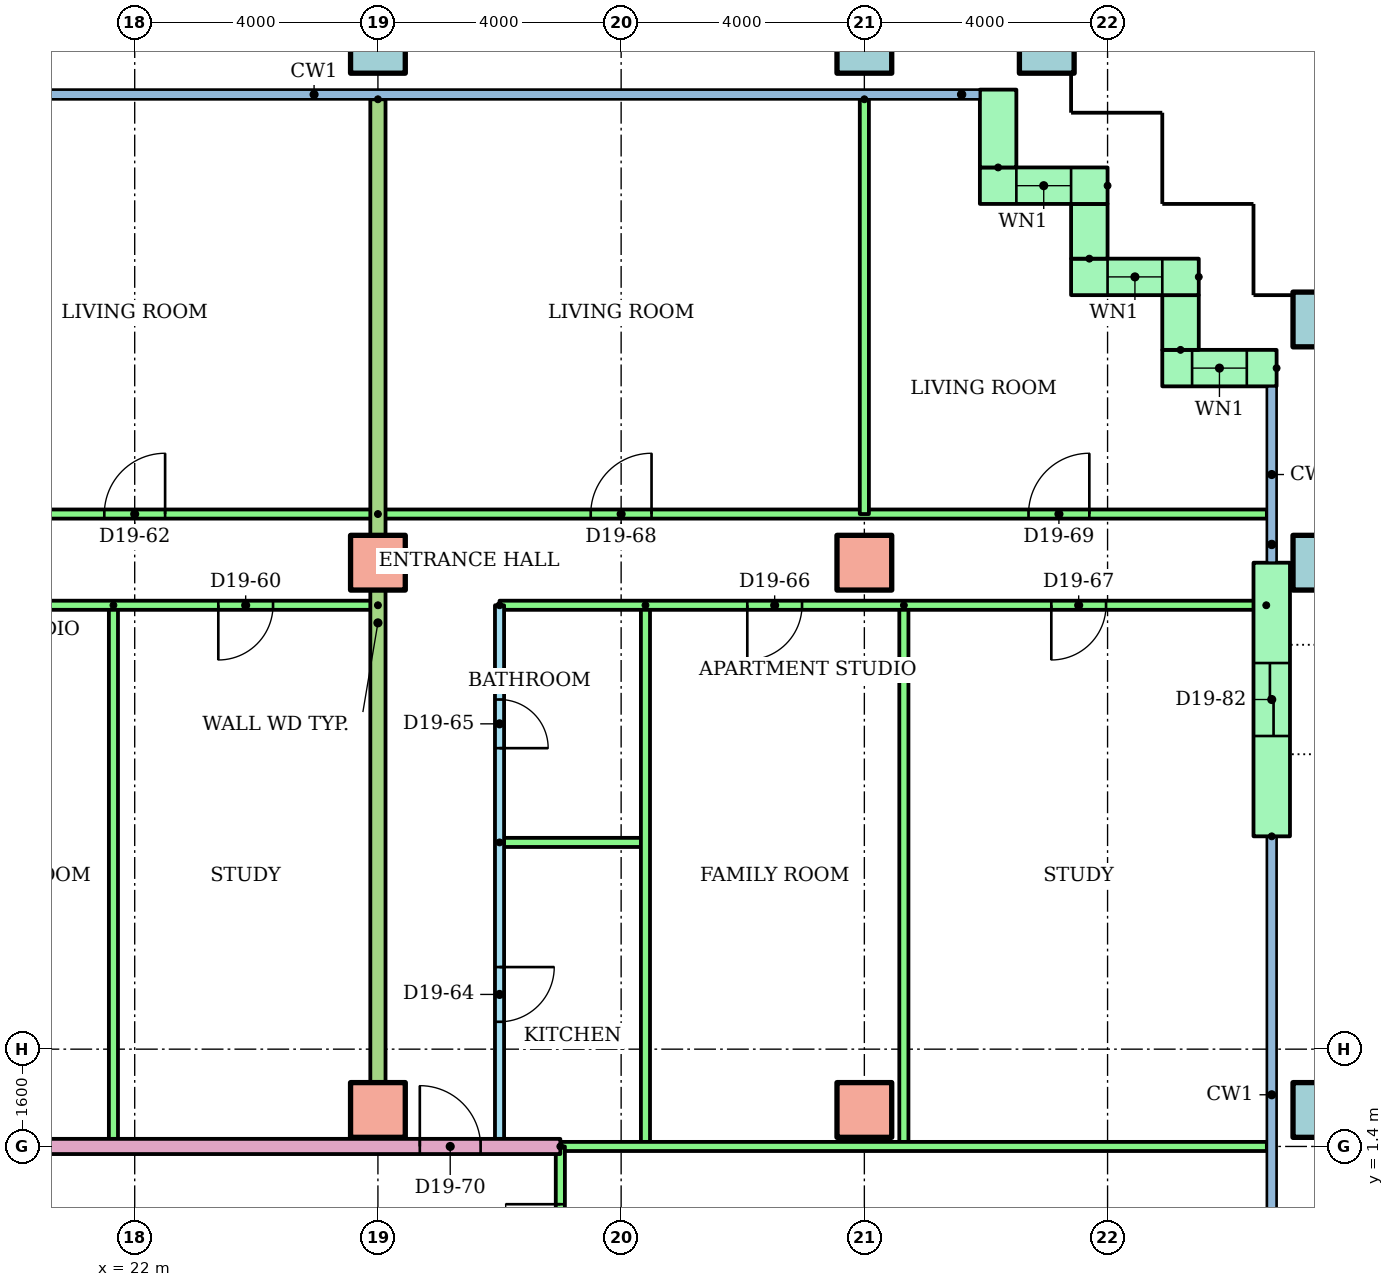
"""IFC4 building model, lengths in metres.
Left out: names, types, materials, properties, quantities, classifications, styles, units other than length and angle.
Written with IfcOpenShell. Run it as: python <this file> out.ifc"""

import sys

from ifc_helpers import new_model, si_unit, direction, frame, frame_2d, origin, origin_2d, place, context, subcontext, project, spatial, rectangle, hollow_rectangle, extrude, element, fill, save


model = new_model("IFC4")
c1 = context("Model", 3, precision=1e-05, world=origin(), true_north=direction((0.0, 1.0)))
c2 = subcontext(c1, "Body", "Model", "MODEL_VIEW")
j1 = project(units=[si_unit("LENGTHUNIT", "METRE"), si_unit("PLANEANGLEUNIT", "RADIAN")], contexts=[c1])
p1 = place(None, origin())
s1 = spatial("IfcSite", under=j1, at=p1, CompositionType="ELEMENT")
p2 = place(p1, origin())
s2 = spatial("IfcBuilding", under=s1, at=p2, CompositionType="ELEMENT")
p3 = place(p2, frame((0.0, 0.0, 77.5)))
s3 = spatial("IfcBuildingStorey", under=s2, at=p3, CompositionType="ELEMENT", Elevation=77.5)
for number, where in (
    (1, (26.0, 2.0, 0.0)),
    (2, (34.0, 2.0, 0.0)),
):
    element("IfcColumn", number, at=place(p3, frame(where)), inside=s3, PredefinedType="COLUMN", context=c2, shape_type="SweptSolid", body=[
        extrude(rectangle(XDim=0.9, YDim=0.9, at=origin_2d()), origin(), (0.0, 0.0, 1.0), 3.2),
    ])
p4 = place(p3, frame((41.5, 2.0, 0.0)))
e3 = element("IfcColumn", 3, at=p4, inside=s3, PredefinedType="COLUMN", context=c2, shape_type="SweptSolid", body=[
    extrude(hollow_rectangle(XDim=0.9, YDim=0.9, WallThickness=0.045, at=origin_2d()), origin(), (0.0, 0.0, 1.0), 3.2),
])
for number, where in (
    (4, (26.0, 11.0, 0.0)),
    (5, (34.0, 11.0, 0.0)),
):
    element("IfcColumn", number, at=place(p3, frame(where)), inside=s3, PredefinedType="COLUMN", context=c2, shape_type="SweptSolid", body=[
        extrude(rectangle(XDim=0.9, YDim=0.9, at=origin_2d()), origin(), (0.0, 0.0, 1.0), 3.2),
    ])
for number, where in (
    (6, (41.5, 11.0, 0.0)),
    (7, (41.5, 15.0, 0.0)),
    (8, (26.0, 19.5, 0.0)),
    (9, (34.0, 19.5, 0.0)),
    (10, (37.0, 19.5, 0.0)),
):
    element("IfcColumn", number, at=place(p3, frame(where)), inside=s3, PredefinedType="COLUMN", context=c2, shape_type="SweptSolid", body=[
        extrude(hollow_rectangle(XDim=0.9, YDim=0.9, WallThickness=0.045, at=origin_2d()), origin(), (0.0, 0.0, 1.0), 3.2),
    ])
p5 = place(p3, frame((40.78, 14.2, 0.0), z_axis=(0.0, 0.0, 1.0), x_axis=(-1.0, 0.0, 0.0)))
e11 = element("IfcWall", 11, at=p5, inside=s3, PredefinedType="STANDARD", context=c2, shape_type="SweptSolid", body=[
    extrude(rectangle(XDim=1.88, YDim=0.6, at=frame_2d((0.94, 0.0))), origin(), (0.0, 0.0, 1.0), 2.92),
])
p6 = place(p5, frame((0.49, 0.0, 0.9)))
e12 = element("IfcOpeningElement", 12, at=p6, cuts=e11, PredefinedType="OPENING", context=c2, shape_type="SweptSolid", body=[
    extrude(rectangle(XDim=0.9, YDim=1.5, at=frame_2d((0.45, 0.75))), frame((0.0, 0.31, 0.0), z_axis=(0.0, -1.0, 0.0), x_axis=(1.0, 0.0, 0.0)), (0.0, 0.0, 1.0), 0.62),
])
p7 = place(p3, frame((39.2, 14.5, 0.0), z_axis=(0.0, 0.0, 1.0), x_axis=(0.0, 1.0, 0.0)))
e13 = element("IfcWall", 13, at=p7, inside=s3, PredefinedType="STANDARD", context=c2, shape_type="SweptSolid", body=[
    extrude(rectangle(XDim=0.9, YDim=0.6, at=frame_2d((0.45, 0.0))), origin(), (0.0, 0.0, 1.0), 2.92),
])
p8 = place(p3, frame((39.5, 15.7, 0.0), z_axis=(0.0, 0.0, 1.0), x_axis=(-1.0, 0.0, 0.0)))
e14 = element("IfcWall", 14, at=p8, inside=s3, PredefinedType="STANDARD", context=c2, shape_type="SweptSolid", body=[
    extrude(rectangle(XDim=2.1, YDim=0.6, at=frame_2d((1.05, 0.0))), origin(), (0.0, 0.0, 1.0), 2.92),
])
p9 = place(p8, frame((0.6, 0.0, 0.9)))
e15 = element("IfcOpeningElement", 15, at=p9, cuts=e14, PredefinedType="OPENING", context=c2, shape_type="SweptSolid", body=[
    extrude(rectangle(XDim=0.9, YDim=1.5, at=frame_2d((0.45, 0.75))), frame((0.0, 0.31, 0.0), z_axis=(0.0, -1.0, 0.0), x_axis=(1.0, 0.0, 0.0)), (0.0, 0.0, 1.0), 0.62),
])
p10 = place(p3, frame((37.7, 16.0, 0.0), z_axis=(0.0, 0.0, 1.0), x_axis=(0.0, 1.0, 0.0)))
e16 = element("IfcWall", 16, at=p10, inside=s3, PredefinedType="STANDARD", context=c2, shape_type="SweptSolid", body=[
    extrude(rectangle(XDim=0.9, YDim=0.6, at=frame_2d((0.45, 0.0))), origin(), (0.0, 0.0, 1.0), 2.92),
])
p11 = place(p3, frame((38.0, 17.2, 0.0), z_axis=(0.0, 0.0, 1.0), x_axis=(-1.0, 0.0, 0.0)))
e17 = element("IfcWall", 17, at=p11, inside=s3, PredefinedType="STANDARD", context=c2, shape_type="SweptSolid", body=[
    extrude(rectangle(XDim=2.1, YDim=0.6, at=frame_2d((1.05, 0.0))), origin(), (0.0, 0.0, 1.0), 2.92),
])
p12 = place(p11, frame((0.6, 0.0, 0.9)))
e18 = element("IfcOpeningElement", 18, at=p12, cuts=e17, PredefinedType="OPENING", context=c2, shape_type="SweptSolid", body=[
    extrude(rectangle(XDim=0.9, YDim=1.5, at=frame_2d((0.45, 0.75))), frame((0.0, 0.31, 0.0), z_axis=(0.0, -1.0, 0.0), x_axis=(1.0, 0.0, 0.0)), (0.0, 0.0, 1.0), 0.62),
])
p13 = place(p3, frame((36.2, 17.5, 0.0), z_axis=(0.0, 0.0, 1.0), x_axis=(0.0, 1.0, 0.0)))
e19 = element("IfcWall", 19, at=p13, inside=s3, PredefinedType="STANDARD", context=c2, shape_type="SweptSolid", body=[
    extrude(rectangle(XDim=1.28, YDim=0.6, at=frame_2d((0.64, 0.0))), origin(), (0.0, 0.0, 1.0), 2.92),
])
p14 = place(p3, frame((40.7, 6.5, 0.0), z_axis=(0.0, 0.0, 1.0), x_axis=(0.0, 1.0, 0.0)))
e20 = element("IfcWall", 20, at=p14, inside=s3, PredefinedType="STANDARD", context=c2, shape_type="SweptSolid", body=[
    extrude(rectangle(XDim=4.5, YDim=0.6, at=frame_2d((2.25, 0.0))), origin(), (0.0, 0.0, 1.0), 2.92),
])
p15 = place(p14, frame((1.65, 0.0, 0.0)))
e21 = element("IfcOpeningElement", 21, at=p15, cuts=e20, PredefinedType="OPENING", context=c2, shape_type="SweptSolid", body=[
    extrude(rectangle(XDim=1.2, YDim=2.1, at=frame_2d((0.6, 1.05))), frame((0.0, 0.31, 0.0), z_axis=(0.0, -1.0, 0.0), x_axis=(1.0, 0.0, 0.0)), (0.0, 0.0, 1.0), 0.62),
])
p16 = place(p3, frame((21.65, 10.3, 0.0), z_axis=(0.0, 0.0, 1.0), x_axis=(0.0, -1.0, 0.0)))
e22 = element("IfcWall", 22, at=p16, inside=s3, PredefinedType="PARTITIONING", context=c2, shape_type="SweptSolid", body=[
    extrude(rectangle(XDim=8.9, YDim=0.15, at=frame_2d((4.45, 0.0))), origin(), (0.0, 0.0, 1.0), 2.4),
])
p17 = place(p3, frame((26.0, 10.3, 0.0), z_axis=(0.0, 0.0, 1.0), x_axis=(-1.0, 0.0, 0.0)))
e23 = element("IfcWall", 23, at=p17, inside=s3, PredefinedType="PARTITIONING", context=c2, shape_type="SweptSolid", body=[
    extrude(rectangle(XDim=10.0, YDim=0.15, at=frame_2d((5.0, 0.0))), origin(), (0.0, 0.0, 1.0), 2.4),
])
p18 = place(p17, frame((5.525, 0.0, 0.0)))
e24 = element("IfcOpeningElement", 24, at=p18, cuts=e23, PredefinedType="OPENING", context=c2, shape_type="SweptSolid", body=[
    extrude(rectangle(XDim=0.9, YDim=2.1, at=frame_2d((0.45, 1.05))), frame((0.0, 0.085, 0.0), z_axis=(0.0, -1.0, 0.0), x_axis=(1.0, 0.0, 0.0)), (0.0, 0.0, 1.0), 0.17),
])
p19 = place(p17, frame((1.725, 0.0, 0.0)))
e25 = element("IfcOpeningElement", 25, at=p19, cuts=e23, PredefinedType="OPENING", context=c2, shape_type="SweptSolid", body=[
    extrude(rectangle(XDim=0.9, YDim=2.1, at=frame_2d((0.45, 1.05))), frame((0.0, 0.085, 0.0), z_axis=(0.0, -1.0, 0.0), x_axis=(1.0, 0.0, 0.0)), (0.0, 0.0, 1.0), 0.17),
])
p20 = place(p3, frame((14.0, 11.8, 0.0)))
e26 = element("IfcWall", 26, at=p20, inside=s3, PredefinedType="PARTITIONING", context=c2, shape_type="SweptSolid", body=[
    extrude(rectangle(XDim=12.0, YDim=0.15, at=frame_2d((6.0, 0.0))), origin(), (0.0, 0.0, 1.0), 2.4),
])
p21 = place(p20, frame((1.5, 0.0, 0.0)))
e27 = element("IfcOpeningElement", 27, at=p21, cuts=e26, PredefinedType="OPENING", context=c2, shape_type="SweptSolid", body=[
    extrude(rectangle(XDim=1.0, YDim=2.1, at=frame_2d((0.5, 1.05))), frame((0.0, 0.085, 0.0), z_axis=(0.0, -1.0, 0.0), x_axis=(1.0, 0.0, 0.0)), (0.0, 0.0, 1.0), 0.17),
])
p22 = place(p20, frame((7.5, 0.0, 0.0)))
e28 = element("IfcOpeningElement", 28, at=p22, cuts=e26, PredefinedType="OPENING", context=c2, shape_type="SweptSolid", body=[
    extrude(rectangle(XDim=1.0, YDim=2.1, at=frame_2d((0.5, 1.05))), frame((0.0, 0.085, 0.0), z_axis=(0.0, -1.0, 0.0), x_axis=(1.0, 0.0, 0.0)), (0.0, 0.0, 1.0), 0.17),
])
p23 = place(p3, frame((28.0, 10.3, 0.0), z_axis=(0.0, 0.0, 1.0), x_axis=(0.0, -1.0, 0.0)))
e29 = element("IfcWall", 29, at=p23, inside=s3, PredefinedType="PARTITIONING", context=c2, shape_type="SweptSolid", body=[
    extrude(rectangle(XDim=8.9, YDim=0.15, at=frame_2d((4.45, 0.0))), origin(), (0.0, 0.0, 1.0), 2.4),
])
p24 = place(p23, frame((5.95, 0.0, 0.0)))
e30 = element("IfcOpeningElement", 30, at=p24, cuts=e29, PredefinedType="OPENING", context=c2, shape_type="SweptSolid", body=[
    extrude(rectangle(XDim=0.9, YDim=2.1, at=frame_2d((0.45, 1.05))), frame((0.0, 0.085, 0.0), z_axis=(0.0, -1.0, 0.0), x_axis=(1.0, 0.0, 0.0)), (0.0, 0.0, 1.0), 0.17),
])
p25 = place(p23, frame((1.55, 0.0, 0.0)))
e31 = element("IfcOpeningElement", 31, at=p25, cuts=e29, PredefinedType="OPENING", context=c2, shape_type="SweptSolid", body=[
    extrude(rectangle(XDim=0.8, YDim=2.1, at=frame_2d((0.4, 1.05))), frame((0.0, 0.085, 0.0), z_axis=(0.0, -1.0, 0.0), x_axis=(1.0, 0.0, 0.0)), (0.0, 0.0, 1.0), 0.17),
])
p26 = place(p3, frame((28.0, 6.4, 0.0)))
e32 = element("IfcWall", 32, at=p26, inside=s3, PredefinedType="PARTITIONING", context=c2, shape_type="SweptSolid", body=[
    extrude(rectangle(XDim=2.4, YDim=0.15, at=frame_2d((1.2, 0.0))), origin(), (0.0, 0.0, 1.0), 2.4),
])
for number, where, z_axis, x_axis in (
    (33, (30.4, 10.3, 0.0), (0.0, 0.0, 1.0), (0.0, -1.0, 0.0)),
    (34, (34.65, 10.3, 0.0), (0.0, 0.0, 1.0), (0.0, -1.0, 0.0)),
):
    element("IfcWall", number, at=place(p3, frame(where, z_axis=z_axis, x_axis=x_axis)), inside=s3, PredefinedType="PARTITIONING", context=c2, shape_type="SweptSolid", body=[
        extrude(rectangle(XDim=8.9, YDim=0.15, at=frame_2d((4.45, 0.0))), origin(), (0.0, 0.0, 1.0), 2.4),
    ])
p27 = place(p3, frame((40.61, 10.3, 0.0), z_axis=(0.0, 0.0, 1.0), x_axis=(-1.0, 0.0, 0.0)))
e35 = element("IfcWall", 35, at=p27, inside=s3, PredefinedType="PARTITIONING", context=c2, shape_type="SweptSolid", body=[
    extrude(rectangle(XDim=12.61, YDim=0.15, at=frame_2d((6.305, 0.0))), origin(), (0.0, 0.0, 1.0), 2.4),
])
p28 = place(p27, frame((7.635, 0.0, 0.0)))
e36 = element("IfcOpeningElement", 36, at=p28, cuts=e35, PredefinedType="OPENING", context=c2, shape_type="SweptSolid", body=[
    extrude(rectangle(XDim=0.9, YDim=2.1, at=frame_2d((0.45, 1.05))), frame((0.0, 0.085, 0.0), z_axis=(0.0, -1.0, 0.0), x_axis=(1.0, 0.0, 0.0)), (0.0, 0.0, 1.0), 0.17),
])
p29 = place(p27, frame((2.635, 0.0, 0.0)))
e37 = element("IfcOpeningElement", 37, at=p29, cuts=e35, PredefinedType="OPENING", context=c2, shape_type="SweptSolid", body=[
    extrude(rectangle(XDim=0.9, YDim=2.1, at=frame_2d((0.45, 1.05))), frame((0.0, 0.085, 0.0), z_axis=(0.0, -1.0, 0.0), x_axis=(1.0, 0.0, 0.0)), (0.0, 0.0, 1.0), 0.17),
])
p30 = place(p3, frame((26.0, 11.8, 0.0)))
e38 = element("IfcWall", 38, at=p30, inside=s3, PredefinedType="PARTITIONING", context=c2, shape_type="SweptSolid", body=[
    extrude(rectangle(XDim=14.62, YDim=0.15, at=frame_2d((7.31, 0.0))), origin(), (0.0, 0.0, 1.0), 2.4),
])
p31 = place(p30, frame((3.5, 0.0, 0.0)))
e39 = element("IfcOpeningElement", 39, at=p31, cuts=e38, PredefinedType="OPENING", context=c2, shape_type="SweptSolid", body=[
    extrude(rectangle(XDim=1.0, YDim=2.1, at=frame_2d((0.5, 1.05))), frame((0.0, 0.085, 0.0), z_axis=(0.0, -1.0, 0.0), x_axis=(1.0, 0.0, 0.0)), (0.0, 0.0, 1.0), 0.17),
])
p32 = place(p30, frame((10.7, 0.0, 0.0)))
e40 = element("IfcOpeningElement", 40, at=p32, cuts=e38, PredefinedType="OPENING", context=c2, shape_type="SweptSolid", body=[
    extrude(rectangle(XDim=1.0, YDim=2.1, at=frame_2d((0.5, 1.05))), frame((0.0, 0.085, 0.0), z_axis=(0.0, -1.0, 0.0), x_axis=(1.0, 0.0, 0.0)), (0.0, 0.0, 1.0), 0.17),
])
p33 = place(p3, frame((34.0, 18.621, 0.0), z_axis=(0.0, 0.0, 1.0), x_axis=(0.0, -1.0, 0.0)))
e41 = element("IfcWall", 41, at=p33, inside=s3, PredefinedType="PARTITIONING", context=c2, shape_type="SweptSolid", body=[
    extrude(rectangle(XDim=6.821, YDim=0.15, at=frame_2d((3.411, 0.0))), origin(), (0.0, 0.0, 1.0), 2.4),
])
p34 = place(p3, frame((26.0, 18.621, 0.0), z_axis=(0.0, 0.0, 1.0), x_axis=(0.0, -1.0, 0.0)))
e42 = element("IfcWall", 42, at=p34, inside=s3, PredefinedType="PARTITIONING", context=c2, shape_type="SweptSolid", body=[
    extrude(rectangle(XDim=17.221, YDim=0.25, at=frame_2d((8.611, 0.0))), origin(), (0.0, 0.0, 1.0), 2.4),
])
p35 = place(p3, frame((14.0, 1.4, 0.0)))
e43 = element("IfcWall", 43, at=p35, inside=s3, PredefinedType="PARTITIONING", context=c2, shape_type="SweptSolid", body=[
    extrude(rectangle(XDim=15.0, YDim=0.25, at=frame_2d((7.5, 0.0))), origin(), (0.0, 0.0, 1.0), 2.4),
])
p36 = place(p35, frame((0.5, 0.0, 0.0)))
e44 = element("IfcOpeningElement", 44, at=p36, cuts=e43, PredefinedType="OPENING", context=c2, shape_type="SweptSolid", body=[
    extrude(rectangle(XDim=1.0, YDim=2.1, at=frame_2d((0.5, 1.05))), frame((0.0, 0.135, 0.0), z_axis=(0.0, -1.0, 0.0), x_axis=(1.0, 0.0, 0.0)), (0.0, 0.0, 1.0), 0.27),
])
p37 = place(p35, frame((12.689, 0.0, 0.0)))
e45 = element("IfcOpeningElement", 45, at=p37, cuts=e43, PredefinedType="OPENING", context=c2, shape_type="SweptSolid", body=[
    extrude(rectangle(XDim=1.0, YDim=2.1, at=frame_2d((0.5, 1.05))), frame((0.0, 0.135, 0.0), z_axis=(0.0, -1.0, 0.0), x_axis=(1.0, 0.0, 0.0)), (0.0, 0.0, 1.0), 0.27),
])
p38 = place(p3, frame((29.0, 1.4, 0.0)))
e46 = element("IfcWall", 46, at=p38, inside=s3, PredefinedType="PARTITIONING", context=c2, shape_type="SweptSolid", body=[
    extrude(rectangle(XDim=11.62, YDim=0.15, at=frame_2d((5.81, 0.0))), origin(), (0.0, 0.0, 1.0), 2.4),
])
p39 = place(p3, frame((29.0, -1.4, 0.0), z_axis=(0.0, 0.0, 1.0), x_axis=(0.0, 1.0, 0.0)))
e47 = element("IfcWall", 47, at=p39, inside=s3, PredefinedType="PARTITIONING", context=c2, shape_type="SweptSolid", body=[
    extrude(rectangle(XDim=2.8, YDim=0.15, at=frame_2d((1.4, 0.0))), origin(), (0.0, 0.0, 1.0), 2.4),
])
p40 = place(p39, frame((0.95, 0.0, 0.0)))
e48 = element("IfcOpeningElement", 48, at=p40, cuts=e47, PredefinedType="OPENING", context=c2, shape_type="SweptSolid", body=[
    extrude(rectangle(XDim=0.9, YDim=2.1, at=frame_2d((0.45, 1.05))), frame((0.0, 0.085, 0.0), z_axis=(0.0, -1.0, 0.0), x_axis=(1.0, 0.0, 0.0)), (0.0, 0.0, 1.0), 0.17),
])
p41 = place(p6, origin())
e49 = element("IfcWindow", 49, at=p41, inside=s3, PartitioningType="SINGLE_PANEL", PredefinedType="WINDOW", context=c2, shape_type="SweptSolid", body=[
    extrude(rectangle(XDim=0.9, YDim=1.5, at=frame_2d((0.45, 0.75))), frame((0.0, 0.03, 0.0), z_axis=(0.0, -1.0, 0.0), x_axis=(1.0, 0.0, 0.0)), (0.0, 0.0, 1.0), 0.06),
])
fill(e12, e49)
p42 = place(p9, origin())
e50 = element("IfcWindow", 50, at=p42, inside=s3, PartitioningType="SINGLE_PANEL", PredefinedType="WINDOW", context=c2, shape_type="SweptSolid", body=[
    extrude(rectangle(XDim=0.9, YDim=1.5, at=frame_2d((0.45, 0.75))), frame((0.0, 0.03, 0.0), z_axis=(0.0, -1.0, 0.0), x_axis=(1.0, 0.0, 0.0)), (0.0, 0.0, 1.0), 0.06),
])
fill(e15, e50)
p43 = place(p12, origin())
e51 = element("IfcWindow", 51, at=p43, inside=s3, PartitioningType="SINGLE_PANEL", PredefinedType="WINDOW", context=c2, shape_type="SweptSolid", body=[
    extrude(rectangle(XDim=0.9, YDim=1.5, at=frame_2d((0.45, 0.75))), frame((0.0, 0.03, 0.0), z_axis=(0.0, -1.0, 0.0), x_axis=(1.0, 0.0, 0.0)), (0.0, 0.0, 1.0), 0.06),
])
fill(e18, e51)
p44 = place(p19, origin())
e52 = element("IfcDoor", 52, at=p44, inside=s3, OperationType="SINGLE_SWING_RIGHT", PredefinedType="DOOR", context=c2, shape_type="SweptSolid", body=[
    extrude(rectangle(XDim=0.9, YDim=2.1, at=frame_2d((0.45, 1.05))), frame((0.0, 0.025, 0.0), z_axis=(0.0, -1.0, 0.0), x_axis=(1.0, 0.0, 0.0)), (0.0, 0.0, 1.0), 0.05),
])
fill(e25, e52)
p45 = place(p22, origin())
e53 = element("IfcDoor", 53, at=p45, inside=s3, OperationType="SINGLE_SWING_RIGHT", PredefinedType="DOOR", context=c2, shape_type="SweptSolid", body=[
    extrude(rectangle(XDim=1.0, YDim=2.1, at=frame_2d((0.5, 1.05))), frame((0.0, 0.025, 0.0), z_axis=(0.0, -1.0, 0.0), x_axis=(1.0, 0.0, 0.0)), (0.0, 0.0, 1.0), 0.05),
])
fill(e28, e53)
p46 = place(p24, origin())
e54 = element("IfcDoor", 54, at=p46, inside=s3, OperationType="SINGLE_SWING_LEFT", PredefinedType="DOOR", context=c2, shape_type="SweptSolid", body=[
    extrude(rectangle(XDim=0.9, YDim=2.1, at=frame_2d((0.45, 1.05))), frame((0.0, 0.025, 0.0), z_axis=(0.0, -1.0, 0.0), x_axis=(1.0, 0.0, 0.0)), (0.0, 0.0, 1.0), 0.05),
])
fill(e30, e54)
p47 = place(p25, origin())
e55 = element("IfcDoor", 55, at=p47, inside=s3, OperationType="SINGLE_SWING_RIGHT", PredefinedType="DOOR", context=c2, shape_type="SweptSolid", body=[
    extrude(rectangle(XDim=0.8, YDim=2.1, at=frame_2d((0.4, 1.05))), frame((0.0, 0.025, 0.0), z_axis=(0.0, -1.0, 0.0), x_axis=(1.0, 0.0, 0.0)), (0.0, 0.0, 1.0), 0.05),
])
fill(e31, e55)
p48 = place(p28, origin())
e56 = element("IfcDoor", 56, at=p48, inside=s3, OperationType="SINGLE_SWING_RIGHT", PredefinedType="DOOR", context=c2, shape_type="SweptSolid", body=[
    extrude(rectangle(XDim=0.9, YDim=2.1, at=frame_2d((0.45, 1.05))), frame((0.0, 0.025, 0.0), z_axis=(0.0, -1.0, 0.0), x_axis=(1.0, 0.0, 0.0)), (0.0, 0.0, 1.0), 0.05),
])
fill(e36, e56)
p49 = place(p29, origin())
e57 = element("IfcDoor", 57, at=p49, inside=s3, OperationType="SINGLE_SWING_RIGHT", PredefinedType="DOOR", context=c2, shape_type="SweptSolid", body=[
    extrude(rectangle(XDim=0.9, YDim=2.1, at=frame_2d((0.45, 1.05))), frame((0.0, 0.025, 0.0), z_axis=(0.0, -1.0, 0.0), x_axis=(1.0, 0.0, 0.0)), (0.0, 0.0, 1.0), 0.05),
])
fill(e37, e57)
p50 = place(p31, origin())
e58 = element("IfcDoor", 58, at=p50, inside=s3, OperationType="SINGLE_SWING_RIGHT", PredefinedType="DOOR", context=c2, shape_type="SweptSolid", body=[
    extrude(rectangle(XDim=1.0, YDim=2.1, at=frame_2d((0.5, 1.05))), frame((0.0, 0.025, 0.0), z_axis=(0.0, -1.0, 0.0), x_axis=(1.0, 0.0, 0.0)), (0.0, 0.0, 1.0), 0.05),
])
fill(e39, e58)
p51 = place(p32, origin())
e59 = element("IfcDoor", 59, at=p51, inside=s3, OperationType="SINGLE_SWING_RIGHT", PredefinedType="DOOR", context=c2, shape_type="SweptSolid", body=[
    extrude(rectangle(XDim=1.0, YDim=2.1, at=frame_2d((0.5, 1.05))), frame((0.0, 0.025, 0.0), z_axis=(0.0, -1.0, 0.0), x_axis=(1.0, 0.0, 0.0)), (0.0, 0.0, 1.0), 0.05),
])
fill(e40, e59)
p52 = place(p37, origin())
e60 = element("IfcDoor", 60, at=p52, inside=s3, OperationType="SINGLE_SWING_LEFT", PredefinedType="DOOR", context=c2, shape_type="SweptSolid", body=[
    extrude(rectangle(XDim=1.0, YDim=2.1, at=frame_2d((0.5, 1.05))), frame((0.0, 0.025, 0.0), z_axis=(0.0, -1.0, 0.0), x_axis=(1.0, 0.0, 0.0)), (0.0, 0.0, 1.0), 0.05),
])
fill(e45, e60)
p53 = place(p40, origin())
e61 = element("IfcDoor", 61, at=p53, inside=s3, OperationType="SINGLE_SWING_RIGHT", PredefinedType="DOOR", context=c2, shape_type="SweptSolid", body=[
    extrude(rectangle(XDim=0.9, YDim=2.1, at=frame_2d((0.45, 1.05))), frame((0.0, 0.025, 0.0), z_axis=(0.0, -1.0, 0.0), x_axis=(1.0, 0.0, 0.0)), (0.0, 0.0, 1.0), 0.05),
])
fill(e48, e61)
p54 = place(p15, origin())
e62 = element("IfcDoor", 62, at=p54, inside=s3, OperationType="SLIDING_TO_LEFT", PredefinedType="DOOR", context=c2, shape_type="SweptSolid", body=[
    extrude(rectangle(XDim=1.2, YDim=2.1, at=frame_2d((0.6, 1.05))), frame((0.0, 0.025, 0.0), z_axis=(0.0, -1.0, 0.0), x_axis=(1.0, 0.0, 0.0)), (0.0, 0.0, 1.0), 0.05),
])
fill(e21, e62)
save(model, sys.argv[1])
